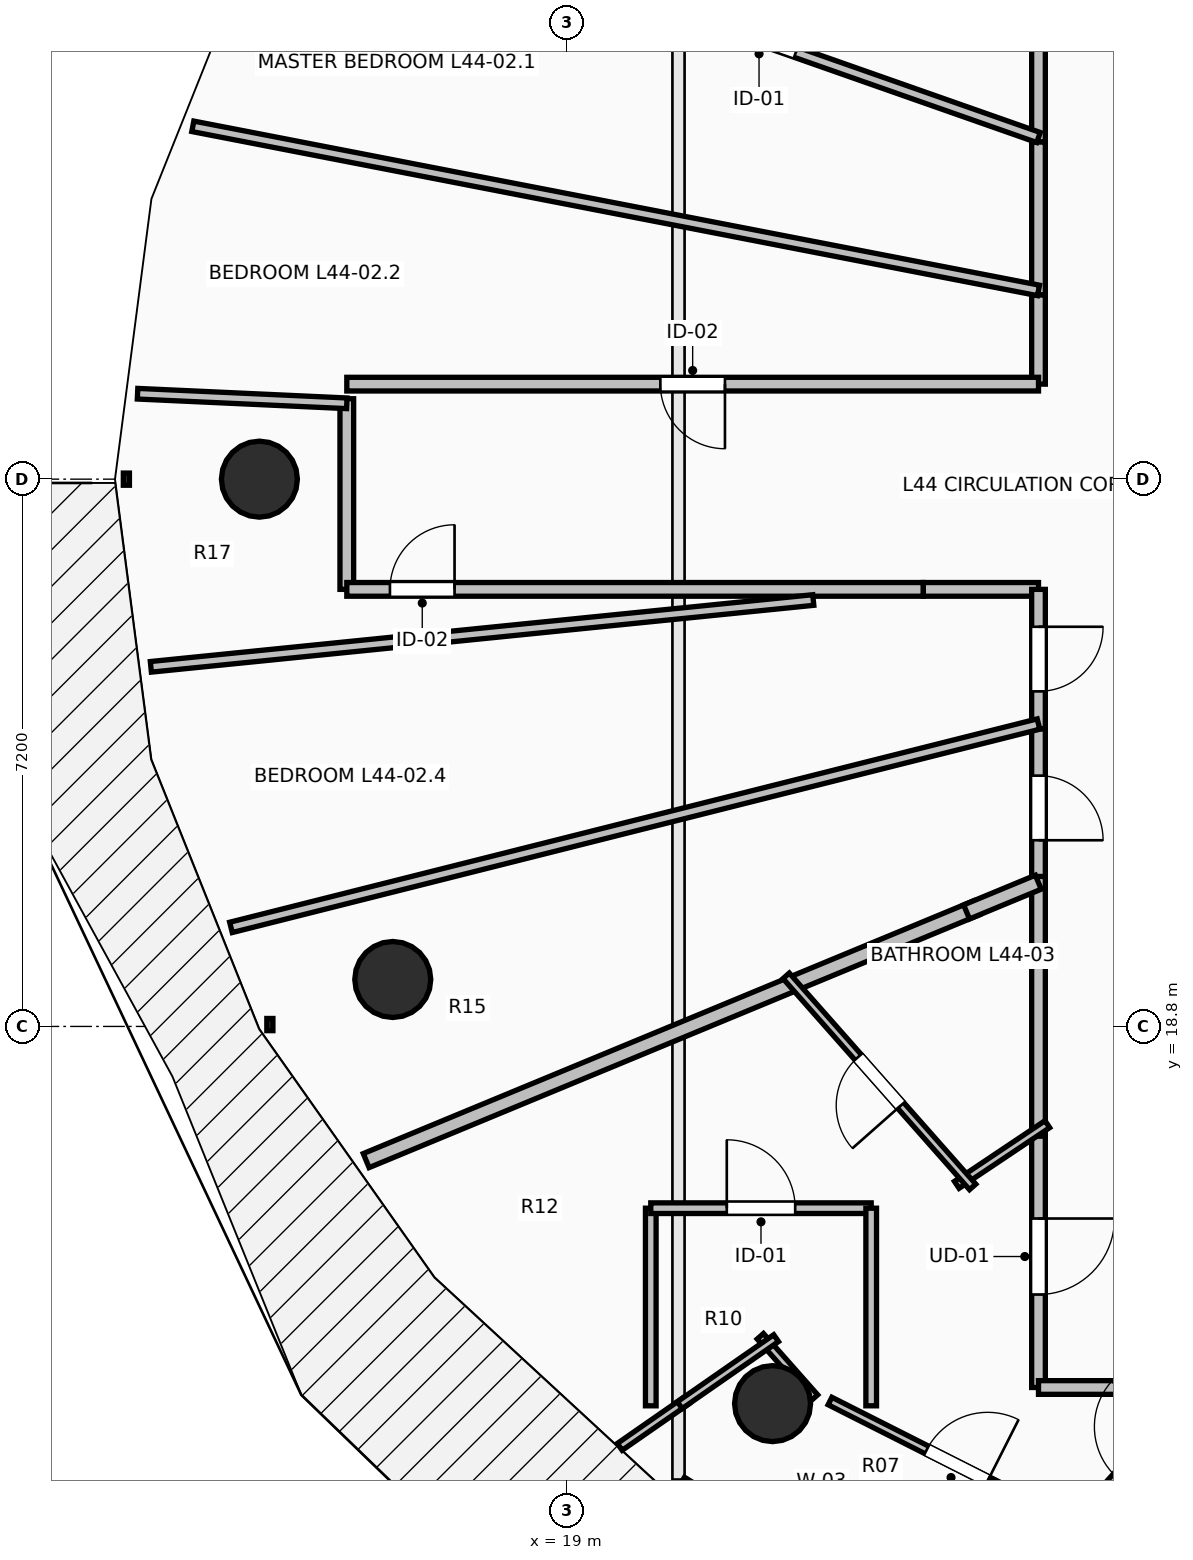
"""IFC4 building model, lengths in metres.
Left out: names, types, materials, properties, quantities, classifications, styles, units other than length and angle.
Written with IfcOpenShell. Run it as: python <this file> out.ifc"""

import sys

from ifc_helpers import new_model, si_unit, direction, frame, frame_2d, origin, origin_2d, place, context, subcontext, project, spatial, rectangle, circle, extrude, element, fill, save


model = new_model("IFC4")
c1 = context("Model", 3, precision=1e-05, world=origin(), true_north=direction((0.0, 1.0)))
c2 = subcontext(c1, "Body", "Model", "MODEL_VIEW")
j1 = project(units=[si_unit("LENGTHUNIT", "METRE"), si_unit("PLANEANGLEUNIT", "RADIAN")], contexts=[c1])
p1 = place(None, origin())
s1 = spatial("IfcSite", under=j1, at=p1, CompositionType="ELEMENT")
p2 = place(p1, origin())
s2 = spatial("IfcBuilding", under=s1, at=p2, CompositionType="ELEMENT")
p3 = place(p2, frame((0.0, 0.0, 164.1)))
s3 = spatial("IfcBuildingStorey", under=s2, at=p3, CompositionType="ELEMENT", Elevation=164.1)
for number, where, z_axis, x_axis in (
    (1, (14.95, 26.0, 0.0), (0.0, 0.0, 1.0), (-1.0, 0.0, 0.0)),
    (2, (16.705, 19.418, 0.0), (0.0, 0.0, 1.0), (-0.924, -0.383, 0.0)),
    (3, (21.701, 13.838, 0.0), (0.0, 0.0, 1.0), (-0.707, -0.707, 0.0)),
):
    element("IfcColumn", number, at=place(p3, frame(where, z_axis=z_axis, x_axis=x_axis)), inside=s3, PredefinedType="COLUMN", context=c2, shape_type="SweptSolid", body=[
        extrude(circle(Radius=0.5, at=origin_2d()), origin(), (0.0, 0.0, 1.0), 3.5),
    ])
p4 = place(p3, frame((20.464, 12.742, 0.0), z_axis=(0.0, 0.0, 1.0), x_axis=(0.849721181976, -0.527232313977, 0.0)))
e4 = element("IfcWall", 4, at=p4, inside=s3, PredefinedType="STANDARD", context=c2, shape_type="SweptSolid", body=[
    extrude(rectangle(XDim=4.423, YDim=0.3, at=frame_2d((2.211, 0.0))), origin(), (0.0, 0.0, 1.0), 3.24),
])
p5 = place(p4, frame((1.011, 0.0, 0.85)))
e5 = element("IfcOpeningElement", 5, at=p5, cuts=e4, PredefinedType="OPENING", context=c2, shape_type="SweptSolid", body=[
    extrude(rectangle(XDim=2.4, YDim=2.19, at=frame_2d((1.2, 1.095))), frame((0.0, 0.165, 0.0), z_axis=(0.0, -1.0, 0.0), x_axis=(1.0, 0.0, 0.0)), (0.0, 0.0, 1.0), 0.33),
])
p6 = place(p3, frame((25.2, 34.613, 0.0), z_axis=(0.0, 0.0, 1.0), x_axis=(0.0, -1.0, 0.0)))
e6 = element("IfcWall", 6, at=p6, inside=s3, PredefinedType="PARTITIONING", context=c2, shape_type="SweptSolid", body=[
    extrude(rectangle(XDim=4.178, YDim=0.18, at=frame_2d((2.089, 0.0))), origin(), (0.0, 0.0, 1.0), 2.929),
])
p7 = place(p6, frame((1.589, 0.0, 0.0)))
e7 = element("IfcOpeningElement", 7, at=p7, cuts=e6, PredefinedType="OPENING", context=c2, shape_type="SweptSolid", body=[
    extrude(rectangle(XDim=1.0, YDim=2.15, at=frame_2d((0.5, 1.075))), frame((0.0, 0.105, 0.0), z_axis=(0.0, -1.0, 0.0), x_axis=(1.0, 0.0, 0.0)), (0.0, 0.0, 1.0), 0.21),
])
p8 = place(p3, frame((25.2, 30.435, 0.0), z_axis=(0.0, 0.0, 1.0), x_axis=(0.0, -1.0, 0.0)))
e8 = element("IfcWall", 8, at=p8, inside=s3, PredefinedType="PARTITIONING", context=c2, shape_type="SweptSolid", body=[
    extrude(rectangle(XDim=2.012, YDim=0.18, at=frame_2d((1.006, 0.0))), origin(), (0.0, 0.0, 1.0), 2.432),
])
p9 = place(p3, frame((25.2, 28.423, 0.0), z_axis=(0.0, 0.0, 1.0), x_axis=(0.0, -1.0, 0.0)))
e9 = element("IfcWall", 9, at=p9, inside=s3, PredefinedType="PARTITIONING", context=c2, shape_type="SweptSolid", body=[
    extrude(rectangle(XDim=1.173, YDim=0.18, at=frame_2d((0.586, 0.0))), origin(), (0.0, 0.0, 1.0), 2.432),
])
p10 = place(p3, frame((25.2, 27.25, 0.0), z_axis=(0.0, 0.0, 1.0), x_axis=(-1.0, 0.0, 0.0)))
e10 = element("IfcWall", 10, at=p10, inside=s3, PredefinedType="PARTITIONING", context=c2, shape_type="SweptSolid", body=[
    extrude(rectangle(XDim=9.1, YDim=0.18, at=frame_2d((4.55, 0.0))), origin(), (0.0, 0.0, 1.0), 2.432),
])
p11 = place(p10, frame((4.125, 0.0, 0.0)))
e11 = element("IfcOpeningElement", 11, at=p11, cuts=e10, PredefinedType="OPENING", context=c2, shape_type="SweptSolid", body=[
    extrude(rectangle(XDim=0.85, YDim=2.1, at=frame_2d((0.425, 1.05))), frame((0.0, 0.105, 0.0), z_axis=(0.0, -1.0, 0.0), x_axis=(1.0, 0.0, 0.0)), (0.0, 0.0, 1.0), 0.21),
])
p12 = place(p3, frame((16.1, 27.058, 0.0), z_axis=(0.0, 0.0, 1.0), x_axis=(0.0, -1.0, 0.0)))
e12 = element("IfcWall", 12, at=p12, inside=s3, PredefinedType="PARTITIONING", context=c2, shape_type="SweptSolid", body=[
    extrude(rectangle(XDim=2.508, YDim=0.18, at=frame_2d((1.254, 0.0))), origin(), (0.0, 0.0, 1.0), 2.432),
])
p13 = place(p3, frame((16.1, 24.55, 0.0), z_axis=(0.0, 0.0, 1.0), x_axis=(1.0, 0.0, 0.0)))
e13 = element("IfcWall", 13, at=p13, inside=s3, PredefinedType="PARTITIONING", context=c2, shape_type="SweptSolid", body=[
    extrude(rectangle(XDim=7.585, YDim=0.18, at=frame_2d((3.792, 0.0))), origin(), (0.0, 0.0, 1.0), 2.886),
])
p14 = place(p13, frame((0.567, 0.0, 0.0)))
e14 = element("IfcOpeningElement", 14, at=p14, cuts=e13, PredefinedType="OPENING", context=c2, shape_type="SweptSolid", body=[
    extrude(rectangle(XDim=0.85, YDim=2.1, at=frame_2d((0.425, 1.05))), frame((0.0, 0.105, 0.0), z_axis=(0.0, -1.0, 0.0), x_axis=(1.0, 0.0, 0.0)), (0.0, 0.0, 1.0), 0.21),
])
p15 = place(p3, frame((23.685, 24.55, 0.0), z_axis=(0.0, 0.0, 1.0), x_axis=(1.0, 0.0, 0.0)))
e15 = element("IfcWall", 15, at=p15, inside=s3, PredefinedType="PARTITIONING", context=c2, shape_type="SweptSolid", body=[
    extrude(rectangle(XDim=1.515, YDim=0.18, at=frame_2d((0.757, 0.0))), origin(), (0.0, 0.0, 1.0), 3.24),
])
p16 = place(p3, frame((25.2, 24.55, 0.0), z_axis=(0.0, 0.0, 1.0), x_axis=(0.0, -1.0, 0.0)))
e16 = element("IfcWall", 16, at=p16, inside=s3, PredefinedType="PARTITIONING", context=c2, shape_type="SweptSolid", body=[
    extrude(rectangle(XDim=1.834, YDim=0.18, at=frame_2d((0.917, 0.0))), origin(), (0.0, 0.0, 1.0), 3.24),
])
p17 = place(p16, frame((0.492, 0.0, 0.0)))
e17 = element("IfcOpeningElement", 17, at=p17, cuts=e16, PredefinedType="OPENING", context=c2, shape_type="SweptSolid", body=[
    extrude(rectangle(XDim=0.85, YDim=2.1, at=frame_2d((0.425, 1.05))), frame((0.0, 0.105, 0.0), z_axis=(0.0, -1.0, 0.0), x_axis=(1.0, 0.0, 0.0)), (0.0, 0.0, 1.0), 0.21),
])
p18 = place(p3, frame((25.2, 22.716, 0.0), z_axis=(0.0, 0.0, 1.0), x_axis=(0.0, -1.0, 0.0)))
e18 = element("IfcWall", 18, at=p18, inside=s3, PredefinedType="PARTITIONING", context=c2, shape_type="SweptSolid", body=[
    extrude(rectangle(XDim=2.083, YDim=0.18, at=frame_2d((1.042, 0.0))), origin(), (0.0, 0.0, 1.0), 3.24),
])
p19 = place(p18, frame((0.616, 0.0, 0.0)))
e19 = element("IfcOpeningElement", 19, at=p19, cuts=e18, PredefinedType="OPENING", context=c2, shape_type="SweptSolid", body=[
    extrude(rectangle(XDim=0.85, YDim=2.1, at=frame_2d((0.425, 1.05))), frame((0.0, 0.105, 0.0), z_axis=(0.0, -1.0, 0.0), x_axis=(1.0, 0.0, 0.0)), (0.0, 0.0, 1.0), 0.21),
])
p20 = place(p3, frame((25.2, 17.496, 0.0), z_axis=(0.0, 0.0, 1.0), x_axis=(0.0, -1.0, 0.0)))
e20 = element("IfcWall", 20, at=p20, inside=s3, PredefinedType="PARTITIONING", context=c2, shape_type="SweptSolid", body=[
    extrude(rectangle(XDim=3.446, YDim=0.18, at=frame_2d((1.723, 0.0))), origin(), (0.0, 0.0, 1.0), 2.432),
])
p21 = place(p20, frame((1.223, 0.0, 0.0)))
e21 = element("IfcOpeningElement", 21, at=p21, cuts=e20, PredefinedType="OPENING", context=c2, shape_type="SweptSolid", body=[
    extrude(rectangle(XDim=1.0, YDim=2.15, at=frame_2d((0.5, 1.075))), frame((0.0, 0.105, 0.0), z_axis=(0.0, -1.0, 0.0), x_axis=(1.0, 0.0, 0.0)), (0.0, 0.0, 1.0), 0.21),
])
p22 = place(p3, frame((25.2, 14.05, 0.0), z_axis=(0.0, 0.0, 1.0), x_axis=(1.0, 0.0, 0.0)))
e22 = element("IfcWall", 22, at=p22, inside=s3, PredefinedType="PARTITIONING", context=c2, shape_type="SweptSolid", body=[
    extrude(rectangle(XDim=2.157, YDim=0.18, at=frame_2d((1.079, 0.0))), origin(), (0.0, 0.0, 1.0), 2.886),
])
p23 = place(p3, frame((25.2, 20.773, 0.0), z_axis=(0.0, 0.0, 1.0), x_axis=(0.0, -1.0, 0.0)))
e23 = element("IfcWall", 23, at=p23, inside=s3, PredefinedType="PARTITIONING", context=c2, shape_type="SweptSolid", body=[
    extrude(rectangle(XDim=3.417, YDim=0.18, at=frame_2d((1.708, 0.0))), origin(), (0.0, 0.0, 1.0), 3.24),
])
p24 = place(p3, frame((17.966, 33.035, 0.0), z_axis=(0.0, 0.0, 1.0), x_axis=(0.943515303593, -0.331328948157, 0.0)))
e24 = element("IfcWall", 24, at=p24, inside=s3, PredefinedType="PARTITIONING", context=c2, shape_type="SweptSolid", body=[
    extrude(rectangle(XDim=7.667, YDim=0.14, at=frame_2d((3.833, 0.0))), origin(), (0.0, 0.0, 1.0), 2.886),
])
p25 = place(p24, frame((3.384, 0.0, 0.0)))
e25 = element("IfcOpeningElement", 25, at=p25, cuts=e24, PredefinedType="OPENING", context=c2, shape_type="SweptSolid", body=[
    extrude(rectangle(XDim=0.9, YDim=2.1, at=frame_2d((0.45, 1.05))), frame((0.0, 0.085, 0.0), z_axis=(0.0, -1.0, 0.0), x_axis=(1.0, 0.0, 0.0)), (0.0, 0.0, 1.0), 0.17),
])
p26 = place(p3, frame((14.074, 30.642, 0.0), z_axis=(0.0, 0.0, 1.0), x_axis=(0.981684833641, -0.190512171261, 0.0)))
e26 = element("IfcWall", 26, at=p26, inside=s3, PredefinedType="PARTITIONING", context=c2, shape_type="SweptSolid", body=[
    extrude(rectangle(XDim=11.333, YDim=0.14, at=frame_2d((5.667, 0.0))), origin(), (0.0, 0.0, 1.0), 2.728),
])
p27 = place(p3, frame((13.347, 27.124, 0.0), z_axis=(0.0, 0.0, 1.0), x_axis=(0.998954796292, -0.045709024997, 0.0)))
e27 = element("IfcWall", 27, at=p27, inside=s3, PredefinedType="PARTITIONING", context=c2, shape_type="SweptSolid", body=[
    extrude(rectangle(XDim=2.756, YDim=0.14, at=frame_2d((1.378, 0.0))), origin(), (0.0, 0.0, 1.0), 2.728),
])
p28 = place(p3, frame((13.522, 23.531, 0.0), z_axis=(0.0, 0.0, 1.0), x_axis=(0.994953222339, 0.100339849299, 0.0)))
e28 = element("IfcWall", 28, at=p28, inside=s3, PredefinedType="PARTITIONING", context=c2, shape_type="SweptSolid", body=[
    extrude(rectangle(XDim=8.759, YDim=0.14, at=frame_2d((4.38, 0.0))), origin(), (0.0, 0.0, 1.0), 2.728),
])
p29 = place(p3, frame((14.576, 20.103, 0.0), z_axis=(0.0, 0.0, 1.0), x_axis=(0.969732134757, 0.244171224389, 0.0)))
e29 = element("IfcWall", 29, at=p29, inside=s3, PredefinedType="PARTITIONING", context=c2, shape_type="SweptSolid", body=[
    extrude(rectangle(XDim=10.956, YDim=0.14, at=frame_2d((5.478, 0.0))), origin(), (0.0, 0.0, 1.0), 2.728),
])
p30 = place(p3, frame((16.355, 17.035, 0.0), z_axis=(0.0, 0.0, 1.0), x_axis=(0.923885339237, 0.382669413387, 0.0)))
e30 = element("IfcWall", 30, at=p30, inside=s3, PredefinedType="PARTITIONING", context=c2, shape_type="SweptSolid", body=[
    extrude(rectangle(XDim=8.689, YDim=0.2, at=frame_2d((4.345, 0.0))), origin(), (0.0, 0.0, 1.0), 2.432),
])
p31 = place(p3, frame((24.254, 20.306, 0.0), z_axis=(0.0, 0.0, 1.0), x_axis=(0.923789545328, 0.382900608439, 0.0)))
e31 = element("IfcWall", 31, at=p31, inside=s3, PredefinedType="PARTITIONING", context=c2, shape_type="SweptSolid", body=[
    extrude(rectangle(XDim=1.021, YDim=0.2, at=frame_2d((0.511, 0.0))), origin(), (0.0, 0.0, 1.0), 3.24),
])
p32 = place(p3, frame((25.316, 17.514, 0.0), z_axis=(0.0, 0.0, 1.0), x_axis=(-0.830948636418, -0.556349138253, 0.0)))
e32 = element("IfcWall", 32, at=p32, inside=s3, PredefinedType="PARTITIONING", context=c2, shape_type="SweptSolid", body=[
    extrude(rectangle(XDim=1.434, YDim=0.11, at=frame_2d((0.717, 0.0))), origin(), (0.0, 0.0, 1.0), 2.432),
])
p33 = place(p3, frame((24.334, 16.689, 0.0), z_axis=(0.0, 0.0, 1.0), x_axis=(-0.662140147261, 0.749380027346, 0.0)))
e33 = element("IfcWall", 33, at=p33, inside=s3, PredefinedType="PARTITIONING", context=c2, shape_type="SweptSolid", body=[
    extrude(rectangle(XDim=3.705, YDim=0.11, at=frame_2d((1.853, 0.0))), origin(), (0.0, 0.0, 1.0), 2.432),
])
p34 = place(p33, frame((1.428, 0.0, 0.0)))
e34 = element("IfcOpeningElement", 34, at=p34, cuts=e33, PredefinedType="OPENING", context=c2, shape_type="SweptSolid", body=[
    extrude(rectangle(XDim=0.85, YDim=2.1, at=frame_2d((0.425, 1.05))), frame((0.0, 0.07, 0.0), z_axis=(0.0, -1.0, 0.0), x_axis=(1.0, 0.0, 0.0)), (0.0, 0.0, 1.0), 0.14),
])
p35 = place(p3, frame((22.457, 13.872, 0.0), z_axis=(0.0, 0.0, 1.0), x_axis=(0.892531160695, -0.450985728364, 0.0)))
e35 = element("IfcWall", 35, at=p35, inside=s3, PredefinedType="PARTITIONING", context=c2, shape_type="SweptSolid", body=[
    extrude(rectangle(XDim=3.75, YDim=0.11, at=frame_2d((1.875, 0.0))), origin(), (0.0, 0.0, 1.0), 3.24),
])
p36 = place(p35, frame((1.425, 0.0, 0.0)))
e36 = element("IfcOpeningElement", 36, at=p36, cuts=e35, PredefinedType="OPENING", context=c2, shape_type="SweptSolid", body=[
    extrude(rectangle(XDim=0.9, YDim=2.1, at=frame_2d((0.45, 1.05))), frame((0.0, 0.07, 0.0), z_axis=(0.0, -1.0, 0.0), x_axis=(1.0, 0.0, 0.0)), (0.0, 0.0, 1.0), 0.14),
])
p37 = place(p3, frame((19.691, 13.269, 0.0), z_axis=(0.0, 0.0, 1.0), x_axis=(0.821239462259, 0.57058368854, 0.0)))
e37 = element("IfcWall", 37, at=p37, inside=s3, PredefinedType="PARTITIONING", context=c2, shape_type="SweptSolid", body=[
    extrude(rectangle(XDim=1.071, YDim=0.11, at=frame_2d((0.536, 0.0))), origin(), (0.0, 0.0, 1.0), 3.24),
])
p38 = place(p3, frame((20.099, 13.809, 0.0), z_axis=(0.0, 0.0, 1.0), x_axis=(0.0, 1.0, 0.0)))
e38 = element("IfcWall", 38, at=p38, inside=s3, PredefinedType="PARTITIONING", context=c2, shape_type="SweptSolid", body=[
    extrude(rectangle(XDim=2.6, YDim=0.14, at=frame_2d((1.3, 0.0))), origin(), (0.0, 0.0, 1.0), 2.728),
])
p39 = place(p3, frame((20.099, 16.409, 0.0), z_axis=(0.0, 0.0, 1.0), x_axis=(1.0, 0.0, 0.0)))
e39 = element("IfcWall", 39, at=p39, inside=s3, PredefinedType="PARTITIONING", context=c2, shape_type="SweptSolid", body=[
    extrude(rectangle(XDim=2.9, YDim=0.14, at=frame_2d((1.45, 0.0))), origin(), (0.0, 0.0, 1.0), 2.886),
])
p40 = place(p39, frame((1.0, 0.0, 0.0)))
e40 = element("IfcOpeningElement", 40, at=p40, cuts=e39, PredefinedType="OPENING", context=c2, shape_type="SweptSolid", body=[
    extrude(rectangle(XDim=0.9, YDim=2.1, at=frame_2d((0.45, 1.05))), frame((0.0, 0.085, 0.0), z_axis=(0.0, -1.0, 0.0), x_axis=(1.0, 0.0, 0.0)), (0.0, 0.0, 1.0), 0.17),
])
p41 = place(p3, frame((22.999, 16.409, 0.0), z_axis=(0.0, 0.0, 1.0), x_axis=(0.0, -1.0, 0.0)))
e41 = element("IfcWall", 41, at=p41, inside=s3, PredefinedType="PARTITIONING", context=c2, shape_type="SweptSolid", body=[
    extrude(rectangle(XDim=2.6, YDim=0.14, at=frame_2d((1.3, 0.0))), origin(), (0.0, 0.0, 1.0), 2.432),
])
p42 = place(p3, frame((25.773, 12.348, 0.0), z_axis=(0.0, 0.0, 1.0), x_axis=(0.667197684579, 0.744880694939, 0.0)))
e42 = element("IfcWall", 42, at=p42, inside=s3, PredefinedType="PARTITIONING", context=c2, shape_type="SweptSolid", body=[
    extrude(rectangle(XDim=2.285, YDim=0.14, at=frame_2d((1.143, 0.0))), origin(), (0.0, 0.0, 1.0), 2.886),
])
p43 = place(p42, frame((0.692, 0.0, 0.0)))
e43 = element("IfcOpeningElement", 43, at=p43, cuts=e42, PredefinedType="OPENING", context=c2, shape_type="SweptSolid", body=[
    extrude(rectangle(XDim=0.9, YDim=2.1, at=frame_2d((0.45, 1.05))), frame((0.0, 0.085, 0.0), z_axis=(0.0, -1.0, 0.0), x_axis=(1.0, 0.0, 0.0)), (0.0, 0.0, 1.0), 0.17),
])
p44 = place(p3, frame((22.254, 13.917, 0.0), z_axis=(0.0, 0.0, 1.0), x_axis=(-0.662363540736, 0.749182581154, 0.0)))
e44 = element("IfcWall", 44, at=p44, inside=s3, PredefinedType="PARTITIONING", context=c2, shape_type="SweptSolid", body=[
    extrude(rectangle(XDim=1.077, YDim=0.11, at=frame_2d((0.539, 0.0))), origin(), (0.0, 0.0, 1.0), 2.432),
])
p45 = place(p3, frame((21.748, 14.699, 0.0), z_axis=(0.0, 0.0, 1.0), x_axis=(-0.821040550937, -0.570869874592, 0.0)))
e45 = element("IfcWall", 45, at=p45, inside=s3, PredefinedType="PARTITIONING", context=c2, shape_type="SweptSolid", body=[
    extrude(rectangle(XDim=1.544, YDim=0.11, at=frame_2d((0.772, 0.0))), origin(), (0.0, 0.0, 1.0), 2.728),
])
p46 = place(p21, origin())
e46 = element("IfcDoor", 46, at=p46, inside=s3, OperationType="SINGLE_SWING_LEFT", PredefinedType="DOOR", context=c2, shape_type="SweptSolid", body=[
    extrude(rectangle(XDim=1.0, YDim=2.15, at=frame_2d((0.5, 1.075))), frame((0.0, 0.025, 0.0), z_axis=(0.0, -1.0, 0.0), x_axis=(1.0, 0.0, 0.0)), (0.0, 0.0, 1.0), 0.05),
])
fill(e21, e46)
p47 = place(p25, origin())
e47 = element("IfcDoor", 47, at=p47, inside=s3, OperationType="SINGLE_SWING_RIGHT", PredefinedType="DOOR", context=c2, shape_type="SweptSolid", body=[
    extrude(rectangle(XDim=0.9, YDim=2.1, at=frame_2d((0.45, 1.05))), frame((0.0, 0.025, 0.0), z_axis=(0.0, -1.0, 0.0), x_axis=(1.0, 0.0, 0.0)), (0.0, 0.0, 1.0), 0.05),
])
fill(e25, e47)
p48 = place(p34, origin())
e48 = element("IfcDoor", 48, at=p48, inside=s3, OperationType="SINGLE_SWING_LEFT", PredefinedType="DOOR", context=c2, shape_type="SweptSolid", body=[
    extrude(rectangle(XDim=0.85, YDim=2.1, at=frame_2d((0.425, 1.05))), frame((0.0, 0.025, 0.0), z_axis=(0.0, -1.0, 0.0), x_axis=(1.0, 0.0, 0.0)), (0.0, 0.0, 1.0), 0.05),
])
fill(e34, e48)
p49 = place(p36, origin())
e49 = element("IfcDoor", 49, at=p49, inside=s3, OperationType="SINGLE_SWING_RIGHT", PredefinedType="DOOR", context=c2, shape_type="SweptSolid", body=[
    extrude(rectangle(XDim=0.9, YDim=2.1, at=frame_2d((0.45, 1.05))), frame((0.0, 0.025, 0.0), z_axis=(0.0, -1.0, 0.0), x_axis=(1.0, 0.0, 0.0)), (0.0, 0.0, 1.0), 0.05),
])
fill(e36, e49)
p50 = place(p40, origin())
e50 = element("IfcDoor", 50, at=p50, inside=s3, OperationType="SINGLE_SWING_LEFT", PredefinedType="DOOR", context=c2, shape_type="SweptSolid", body=[
    extrude(rectangle(XDim=0.9, YDim=2.1, at=frame_2d((0.45, 1.05))), frame((0.0, 0.025, 0.0), z_axis=(0.0, -1.0, 0.0), x_axis=(1.0, 0.0, 0.0)), (0.0, 0.0, 1.0), 0.05),
])
fill(e40, e50)
p51 = place(p11, origin())
e51 = element("IfcDoor", 51, at=p51, inside=s3, OperationType="SINGLE_SWING_LEFT", PredefinedType="DOOR", context=c2, shape_type="SweptSolid", body=[
    extrude(rectangle(XDim=0.85, YDim=2.1, at=frame_2d((0.425, 1.05))), frame((0.0, 0.025, 0.0), z_axis=(0.0, -1.0, 0.0), x_axis=(1.0, 0.0, 0.0)), (0.0, 0.0, 1.0), 0.05),
])
fill(e11, e51)
p52 = place(p14, origin())
e52 = element("IfcDoor", 52, at=p52, inside=s3, OperationType="SINGLE_SWING_RIGHT", PredefinedType="DOOR", context=c2, shape_type="SweptSolid", body=[
    extrude(rectangle(XDim=0.85, YDim=2.1, at=frame_2d((0.425, 1.05))), frame((0.0, 0.025, 0.0), z_axis=(0.0, -1.0, 0.0), x_axis=(1.0, 0.0, 0.0)), (0.0, 0.0, 1.0), 0.05),
])
fill(e14, e52)
p53 = place(p17, origin())
e53 = element("IfcDoor", 53, at=p53, inside=s3, OperationType="SINGLE_SWING_LEFT", PredefinedType="DOOR", context=c2, shape_type="SweptSolid", body=[
    extrude(rectangle(XDim=0.85, YDim=2.1, at=frame_2d((0.425, 1.05))), frame((0.0, 0.025, 0.0), z_axis=(0.0, -1.0, 0.0), x_axis=(1.0, 0.0, 0.0)), (0.0, 0.0, 1.0), 0.05),
])
fill(e17, e53)
p54 = place(p19, origin())
e54 = element("IfcDoor", 54, at=p54, inside=s3, OperationType="SINGLE_SWING_RIGHT", PredefinedType="DOOR", context=c2, shape_type="SweptSolid", body=[
    extrude(rectangle(XDim=0.85, YDim=2.1, at=frame_2d((0.425, 1.05))), frame((0.0, 0.025, 0.0), z_axis=(0.0, -1.0, 0.0), x_axis=(1.0, 0.0, 0.0)), (0.0, 0.0, 1.0), 0.05),
])
fill(e19, e54)
save(model, sys.argv[1])
